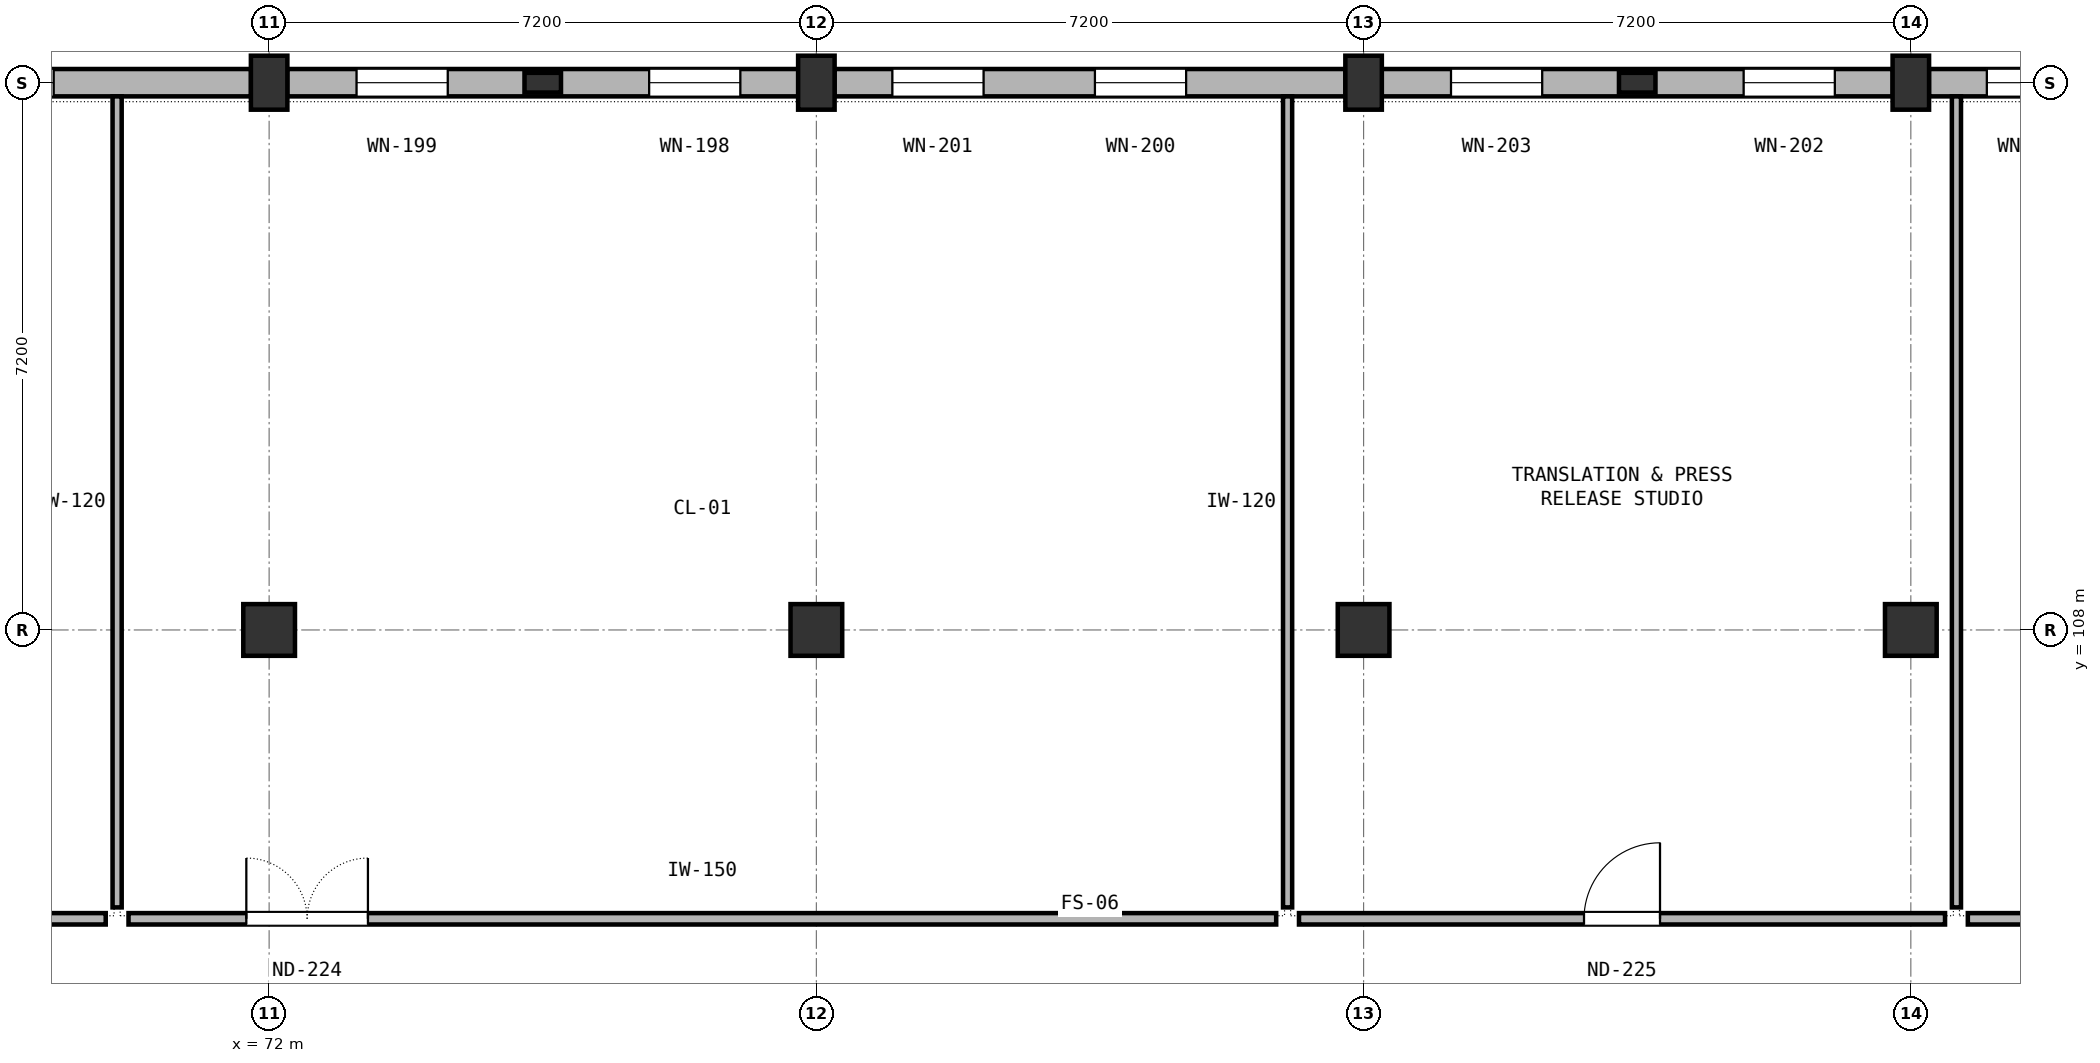
"""IFC4 building model, lengths in metres.
Left out: names, types, materials, properties, quantities, classifications, styles, units other than length and angle.
Written with IfcOpenShell. Run it as: python <this file> out.ifc"""

import sys

from ifc_helpers import new_model, si_unit, direction, frame, frame_2d, origin, origin_2d, place, context, subcontext, project, spatial, rectangle, extrude, element, fill, save


model = new_model("IFC4")
c1 = context("Model", 3, precision=1e-05, world=origin(), true_north=direction((0.0, 1.0)))
c2 = subcontext(c1, "Body", "Model", "MODEL_VIEW")
j1 = project(units=[si_unit("LENGTHUNIT", "METRE"), si_unit("PLANEANGLEUNIT", "RADIAN")], contexts=[c1])
p1 = place(None, origin())
s1 = spatial("IfcSite", under=j1, at=p1, CompositionType="ELEMENT")
p2 = place(p1, origin())
s2 = spatial("IfcBuilding", under=s1, at=p2, CompositionType="ELEMENT")
p3 = place(p2, frame((0.0, 0.0, 26.4)))
s3 = spatial("IfcBuildingStorey", under=s2, at=p3, CompositionType="ELEMENT", Elevation=26.4)
p4 = place(p3, frame((72.0, 108.0, 0.0), z_axis=(0.0, 0.0, 1.0), x_axis=(1.0, 0.0, 0.0)))
e1 = element("IfcColumn", 1, at=p4, inside=s3, PredefinedType="COLUMN", context=c2, shape_type="SweptSolid", body=[
    extrude(rectangle(XDim=0.68, YDim=0.68, at=origin_2d()), origin(), (0.0, 0.0, 1.0), 3.9),
])
p5 = place(p3, frame((72.0, 115.2, 0.0), z_axis=(0.0, 0.0, 1.0), x_axis=(1.0, 0.0, 0.0)))
e2 = element("IfcColumn", 2, at=p5, inside=s3, PredefinedType="COLUMN", context=c2, shape_type="SweptSolid", body=[
    extrude(rectangle(XDim=0.48, YDim=0.71, at=origin_2d()), origin(), (0.0, 0.0, 1.0), 3.9),
])
p6 = place(p3, frame((79.2, 108.0, 0.0), z_axis=(0.0, 0.0, 1.0), x_axis=(1.0, 0.0, 0.0)))
e3 = element("IfcColumn", 3, at=p6, inside=s3, PredefinedType="COLUMN", context=c2, shape_type="SweptSolid", body=[
    extrude(rectangle(XDim=0.68, YDim=0.68, at=origin_2d()), origin(), (0.0, 0.0, 1.0), 3.9),
])
p7 = place(p3, frame((79.2, 115.2, 0.0), z_axis=(0.0, 0.0, 1.0), x_axis=(1.0, 0.0, 0.0)))
e4 = element("IfcColumn", 4, at=p7, inside=s3, PredefinedType="COLUMN", context=c2, shape_type="SweptSolid", body=[
    extrude(rectangle(XDim=0.48, YDim=0.71, at=origin_2d()), origin(), (0.0, 0.0, 1.0), 3.9),
])
p8 = place(p3, frame((86.4, 108.0, 0.0), z_axis=(0.0, 0.0, 1.0), x_axis=(1.0, 0.0, 0.0)))
e5 = element("IfcColumn", 5, at=p8, inside=s3, PredefinedType="COLUMN", context=c2, shape_type="SweptSolid", body=[
    extrude(rectangle(XDim=0.68, YDim=0.68, at=origin_2d()), origin(), (0.0, 0.0, 1.0), 3.9),
])
p9 = place(p3, frame((86.4, 115.2, 0.0), z_axis=(0.0, 0.0, 1.0), x_axis=(1.0, 0.0, 0.0)))
e6 = element("IfcColumn", 6, at=p9, inside=s3, PredefinedType="COLUMN", context=c2, shape_type="SweptSolid", body=[
    extrude(rectangle(XDim=0.48, YDim=0.71, at=origin_2d()), origin(), (0.0, 0.0, 1.0), 3.9),
])
p10 = place(p3, frame((93.6, 108.0, 0.0), z_axis=(0.0, 0.0, 1.0), x_axis=(1.0, 0.0, 0.0)))
e7 = element("IfcColumn", 7, at=p10, inside=s3, PredefinedType="COLUMN", context=c2, shape_type="SweptSolid", body=[
    extrude(rectangle(XDim=0.68, YDim=0.68, at=origin_2d()), origin(), (0.0, 0.0, 1.0), 3.9),
])
p11 = place(p3, frame((93.6, 115.2, 0.0), z_axis=(0.0, 0.0, 1.0), x_axis=(1.0, 0.0, 0.0)))
e8 = element("IfcColumn", 8, at=p11, inside=s3, PredefinedType="COLUMN", context=c2, shape_type="SweptSolid", body=[
    extrude(rectangle(XDim=0.48, YDim=0.71, at=origin_2d()), origin(), (0.0, 0.0, 1.0), 3.9),
])
for number, where, z_axis, x_axis in (
    (9, (75.6, 115.2, 0.0), (0.0, 0.0, 1.0), (1.0, 0.0, 0.0)),
    (10, (90.0, 115.2, 0.0), (0.0, 0.0, 1.0), (1.0, 0.0, 0.0)),
):
    element("IfcColumn", number, at=place(p3, frame(where, z_axis=z_axis, x_axis=x_axis)), inside=s3, PredefinedType="PILASTER", context=c2, shape_type="SweptSolid", body=[
        extrude(rectangle(XDim=0.48, YDim=0.26, at=origin_2d()), origin(), (0.0, 0.0, 1.0), 3.9),
    ])
p12 = place(p3, frame((71.762, 115.2, 0.0), z_axis=(0.0, 0.0, 1.0), x_axis=(-1.0, 0.0, 0.0)))
e11 = element("IfcWall", 11, at=p12, inside=s3, PredefinedType="SOLIDWALL", context=c2, shape_type="SweptSolid", body=[
    extrude(rectangle(XDim=6.724, YDim=0.36, at=frame_2d((3.362, 0.0))), origin(), (0.0, 0.0, 1.0), 2.74),
])
p13 = place(p12, frame((2.597, 0.0, 0.7)))
e12 = element("IfcOpeningElement", 12, at=p13, cuts=e11, PredefinedType="OPENING", context=c2, shape_type="SweptSolid", body=[
    extrude(rectangle(XDim=1.2, YDim=1.84, at=frame_2d((0.6, 0.92))), frame((0.0, 0.19, 0.0), z_axis=(0.0, -1.0, 0.0), x_axis=(1.0, 0.0, 0.0)), (0.0, 0.0, 1.0), 0.38),
])
p14 = place(p12, frame((4.762, 0.0, 0.7)))
e13 = element("IfcOpeningElement", 13, at=p14, cuts=e11, PredefinedType="OPENING", context=c2, shape_type="SweptSolid", body=[
    extrude(rectangle(XDim=1.2, YDim=1.84, at=frame_2d((0.6, 0.92))), frame((0.0, 0.19, 0.0), z_axis=(0.0, -1.0, 0.0), x_axis=(1.0, 0.0, 0.0)), (0.0, 0.0, 1.0), 0.38),
])
p15 = place(p3, frame((78.962, 115.2, 0.0), z_axis=(0.0, 0.0, 1.0), x_axis=(-1.0, 0.0, 0.0)))
e14 = element("IfcWall", 14, at=p15, inside=s3, PredefinedType="SOLIDWALL", context=c2, shape_type="SweptSolid", body=[
    extrude(rectangle(XDim=6.724, YDim=0.36, at=frame_2d((3.362, 0.0))), origin(), (0.0, 0.0, 1.0), 2.74),
])
p16 = place(p15, frame((0.762, 0.0, 0.7)))
e15 = element("IfcOpeningElement", 15, at=p16, cuts=e14, PredefinedType="OPENING", context=c2, shape_type="SweptSolid", body=[
    extrude(rectangle(XDim=1.2, YDim=1.84, at=frame_2d((0.6, 0.92))), frame((0.0, 0.19, 0.0), z_axis=(0.0, -1.0, 0.0), x_axis=(1.0, 0.0, 0.0)), (0.0, 0.0, 1.0), 0.38),
])
p17 = place(p15, frame((4.612, 0.0, 0.7)))
e16 = element("IfcOpeningElement", 16, at=p17, cuts=e14, PredefinedType="OPENING", context=c2, shape_type="SweptSolid", body=[
    extrude(rectangle(XDim=1.2, YDim=1.84, at=frame_2d((0.6, 0.92))), frame((0.0, 0.19, 0.0), z_axis=(0.0, -1.0, 0.0), x_axis=(1.0, 0.0, 0.0)), (0.0, 0.0, 1.0), 0.38),
])
p18 = place(p3, frame((86.162, 115.2, 0.0), z_axis=(0.0, 0.0, 1.0), x_axis=(-1.0, 0.0, 0.0)))
e17 = element("IfcWall", 17, at=p18, inside=s3, PredefinedType="SOLIDWALL", context=c2, shape_type="SweptSolid", body=[
    extrude(rectangle(XDim=6.724, YDim=0.36, at=frame_2d((3.362, 0.0))), origin(), (0.0, 0.0, 1.0), 2.74),
])
p19 = place(p18, frame((2.097, 0.0, 0.7)))
e18 = element("IfcOpeningElement", 18, at=p19, cuts=e17, PredefinedType="OPENING", context=c2, shape_type="SweptSolid", body=[
    extrude(rectangle(XDim=1.2, YDim=1.84, at=frame_2d((0.6, 0.92))), frame((0.0, 0.19, 0.0), z_axis=(0.0, -1.0, 0.0), x_axis=(1.0, 0.0, 0.0)), (0.0, 0.0, 1.0), 0.38),
])
p20 = place(p18, frame((4.762, 0.0, 0.7)))
e19 = element("IfcOpeningElement", 19, at=p20, cuts=e17, PredefinedType="OPENING", context=c2, shape_type="SweptSolid", body=[
    extrude(rectangle(XDim=1.2, YDim=1.84, at=frame_2d((0.6, 0.92))), frame((0.0, 0.19, 0.0), z_axis=(0.0, -1.0, 0.0), x_axis=(1.0, 0.0, 0.0)), (0.0, 0.0, 1.0), 0.38),
])
p21 = place(p3, frame((93.362, 115.2, 0.0), z_axis=(0.0, 0.0, 1.0), x_axis=(-1.0, 0.0, 0.0)))
e20 = element("IfcWall", 20, at=p21, inside=s3, PredefinedType="SOLIDWALL", context=c2, shape_type="SweptSolid", body=[
    extrude(rectangle(XDim=6.724, YDim=0.36, at=frame_2d((3.362, 0.0))), origin(), (0.0, 0.0, 1.0), 2.74),
])
p22 = place(p21, frame((0.762, 0.0, 0.7)))
e21 = element("IfcOpeningElement", 21, at=p22, cuts=e20, PredefinedType="OPENING", context=c2, shape_type="SweptSolid", body=[
    extrude(rectangle(XDim=1.2, YDim=1.84, at=frame_2d((0.6, 0.92))), frame((0.0, 0.19, 0.0), z_axis=(0.0, -1.0, 0.0), x_axis=(1.0, 0.0, 0.0)), (0.0, 0.0, 1.0), 0.38),
])
p23 = place(p21, frame((4.612, 0.0, 0.7)))
e22 = element("IfcOpeningElement", 22, at=p23, cuts=e20, PredefinedType="OPENING", context=c2, shape_type="SweptSolid", body=[
    extrude(rectangle(XDim=1.2, YDim=1.84, at=frame_2d((0.6, 0.92))), frame((0.0, 0.19, 0.0), z_axis=(0.0, -1.0, 0.0), x_axis=(1.0, 0.0, 0.0)), (0.0, 0.0, 1.0), 0.38),
])
p24 = place(p3, frame((100.562, 115.2, 0.0), z_axis=(0.0, 0.0, 1.0), x_axis=(-1.0, 0.0, 0.0)))
e23 = element("IfcWall", 23, at=p24, inside=s3, PredefinedType="SOLIDWALL", context=c2, shape_type="SweptSolid", body=[
    extrude(rectangle(XDim=6.724, YDim=0.36, at=frame_2d((3.362, 0.0))), origin(), (0.0, 0.0, 1.0), 2.74),
])
p25 = place(p24, frame((0.912, 0.0, 0.7)))
e24 = element("IfcOpeningElement", 24, at=p25, cuts=e23, PredefinedType="OPENING", context=c2, shape_type="SweptSolid", body=[
    extrude(rectangle(XDim=1.2, YDim=1.84, at=frame_2d((0.6, 0.92))), frame((0.0, 0.19, 0.0), z_axis=(0.0, -1.0, 0.0), x_axis=(1.0, 0.0, 0.0)), (0.0, 0.0, 1.0), 0.38),
])
p26 = place(p24, frame((4.762, 0.0, 0.7)))
e25 = element("IfcOpeningElement", 25, at=p26, cuts=e23, PredefinedType="OPENING", context=c2, shape_type="SweptSolid", body=[
    extrude(rectangle(XDim=1.2, YDim=1.84, at=frame_2d((0.6, 0.92))), frame((0.0, 0.19, 0.0), z_axis=(0.0, -1.0, 0.0), x_axis=(1.0, 0.0, 0.0)), (0.0, 0.0, 1.0), 0.38),
])
p27 = place(p3, frame((53.75, 104.2, 0.0), z_axis=(0.0, 0.0, 1.0), x_axis=(1.0, 0.0, 0.0)))
e26 = element("IfcWall", 26, at=p27, inside=s3, PredefinedType="PARTITIONING", context=c2, shape_type="SweptSolid", body=[
    extrude(rectangle(XDim=16.1, YDim=0.15, at=frame_2d((8.05, 0.0))), origin(), (0.0, 0.0, 1.0), 2.78),
])
p28 = place(p27, frame((7.35, 0.0, 0.0)))
e27 = element("IfcOpeningElement", 27, at=p28, cuts=e26, PredefinedType="OPENING", context=c2, shape_type="SweptSolid", body=[
    extrude(rectangle(XDim=1.4, YDim=2.2, at=frame_2d((0.7, 1.1))), frame((0.0, 0.085, 0.0), z_axis=(0.0, -1.0, 0.0), x_axis=(1.0, 0.0, 0.0)), (0.0, 0.0, 1.0), 0.17),
])
p29 = place(p3, frame((70.15, 104.2, 0.0), z_axis=(0.0, 0.0, 1.0), x_axis=(1.0, 0.0, 0.0)))
e28 = element("IfcWall", 28, at=p29, inside=s3, PredefinedType="PARTITIONING", context=c2, shape_type="SweptSolid", body=[
    extrude(rectangle(XDim=15.1, YDim=0.15, at=frame_2d((7.55, 0.0))), origin(), (0.0, 0.0, 1.0), 2.78),
])
p30 = place(p29, frame((1.55, 0.0, 0.0)))
e29 = element("IfcOpeningElement", 29, at=p30, cuts=e28, PredefinedType="OPENING", context=c2, shape_type="SweptSolid", body=[
    extrude(rectangle(XDim=1.6, YDim=2.2, at=frame_2d((0.8, 1.1))), frame((0.0, 0.085, 0.0), z_axis=(0.0, -1.0, 0.0), x_axis=(1.0, 0.0, 0.0)), (0.0, 0.0, 1.0), 0.17),
])
p31 = place(p3, frame((70.0, 104.35, 0.0), z_axis=(0.0, 0.0, 1.0), x_axis=(0.0, 1.0, 0.0)))
e30 = element("IfcWall", 30, at=p31, inside=s3, PredefinedType="PARTITIONING", context=c2, shape_type="SweptSolid", body=[
    extrude(rectangle(XDim=10.67, YDim=0.12, at=frame_2d((5.335, 0.0))), origin(), (0.0, 0.0, 1.0), 2.78),
])
p32 = place(p3, frame((85.55, 104.2, 0.0), z_axis=(0.0, 0.0, 1.0), x_axis=(1.0, 0.0, 0.0)))
e31 = element("IfcWall", 31, at=p32, inside=s3, PredefinedType="PARTITIONING", context=c2, shape_type="SweptSolid", body=[
    extrude(rectangle(XDim=8.5, YDim=0.15, at=frame_2d((4.25, 0.0))), origin(), (0.0, 0.0, 1.0), 2.78),
])
p33 = place(p32, frame((3.75, 0.0, 0.0)))
e32 = element("IfcOpeningElement", 32, at=p33, cuts=e31, PredefinedType="OPENING", context=c2, shape_type="SweptSolid", body=[
    extrude(rectangle(XDim=1.0, YDim=2.15, at=frame_2d((0.5, 1.075))), frame((0.0, 0.085, 0.0), z_axis=(0.0, -1.0, 0.0), x_axis=(1.0, 0.0, 0.0)), (0.0, 0.0, 1.0), 0.17),
])
p34 = place(p3, frame((85.4, 104.35, 0.0), z_axis=(0.0, 0.0, 1.0), x_axis=(0.0, 1.0, 0.0)))
e33 = element("IfcWall", 33, at=p34, inside=s3, PredefinedType="PARTITIONING", context=c2, shape_type="SweptSolid", body=[
    extrude(rectangle(XDim=10.67, YDim=0.12, at=frame_2d((5.335, 0.0))), origin(), (0.0, 0.0, 1.0), 2.78),
])
p35 = place(p3, frame((94.35, 104.2, 0.0), z_axis=(0.0, 0.0, 1.0), x_axis=(1.0, 0.0, 0.0)))
e34 = element("IfcWall", 34, at=p35, inside=s3, PredefinedType="PARTITIONING", context=c2, shape_type="SweptSolid", body=[
    extrude(rectangle(XDim=5.7, YDim=0.15, at=frame_2d((2.85, 0.0))), origin(), (0.0, 0.0, 1.0), 2.78),
])
p36 = place(p35, frame((2.325, 0.0, 0.0)))
e35 = element("IfcOpeningElement", 35, at=p36, cuts=e34, PredefinedType="OPENING", context=c2, shape_type="SweptSolid", body=[
    extrude(rectangle(XDim=1.05, YDim=2.15, at=frame_2d((0.525, 1.075))), frame((0.0, 0.085, 0.0), z_axis=(0.0, -1.0, 0.0), x_axis=(1.0, 0.0, 0.0)), (0.0, 0.0, 1.0), 0.17),
])
p37 = place(p3, frame((94.2, 104.35, 0.0), z_axis=(0.0, 0.0, 1.0), x_axis=(0.0, 1.0, 0.0)))
e36 = element("IfcWall", 36, at=p37, inside=s3, PredefinedType="PARTITIONING", context=c2, shape_type="SweptSolid", body=[
    extrude(rectangle(XDim=10.67, YDim=0.12, at=frame_2d((5.335, 0.0))), origin(), (0.0, 0.0, 1.0), 2.78),
])
p38 = place(p13, origin())
e37 = element("IfcWindow", 37, at=p38, inside=s3, PartitioningType="DOUBLE_PANEL_VERTICAL", PredefinedType="WINDOW", context=c2, shape_type="SweptSolid", body=[
    extrude(rectangle(XDim=1.2, YDim=1.84, at=frame_2d((0.6, 0.92))), frame((0.0, 0.03, 0.0), z_axis=(0.0, -1.0, 0.0), x_axis=(1.0, 0.0, 0.0)), (0.0, 0.0, 1.0), 0.06),
])
fill(e12, e37)
p39 = place(p16, origin())
e38 = element("IfcWindow", 38, at=p39, inside=s3, PartitioningType="DOUBLE_PANEL_VERTICAL", PredefinedType="WINDOW", context=c2, shape_type="SweptSolid", body=[
    extrude(rectangle(XDim=1.2, YDim=1.84, at=frame_2d((0.6, 0.92))), frame((0.0, 0.03, 0.0), z_axis=(0.0, -1.0, 0.0), x_axis=(1.0, 0.0, 0.0)), (0.0, 0.0, 1.0), 0.06),
])
fill(e15, e38)
p40 = place(p17, origin())
e39 = element("IfcWindow", 39, at=p40, inside=s3, PartitioningType="DOUBLE_PANEL_VERTICAL", PredefinedType="WINDOW", context=c2, shape_type="SweptSolid", body=[
    extrude(rectangle(XDim=1.2, YDim=1.84, at=frame_2d((0.6, 0.92))), frame((0.0, 0.03, 0.0), z_axis=(0.0, -1.0, 0.0), x_axis=(1.0, 0.0, 0.0)), (0.0, 0.0, 1.0), 0.06),
])
fill(e16, e39)
p41 = place(p19, origin())
e40 = element("IfcWindow", 40, at=p41, inside=s3, PartitioningType="DOUBLE_PANEL_VERTICAL", PredefinedType="WINDOW", context=c2, shape_type="SweptSolid", body=[
    extrude(rectangle(XDim=1.2, YDim=1.84, at=frame_2d((0.6, 0.92))), frame((0.0, 0.03, 0.0), z_axis=(0.0, -1.0, 0.0), x_axis=(1.0, 0.0, 0.0)), (0.0, 0.0, 1.0), 0.06),
])
fill(e18, e40)
p42 = place(p20, origin())
e41 = element("IfcWindow", 41, at=p42, inside=s3, PartitioningType="DOUBLE_PANEL_VERTICAL", PredefinedType="WINDOW", context=c2, shape_type="SweptSolid", body=[
    extrude(rectangle(XDim=1.2, YDim=1.84, at=frame_2d((0.6, 0.92))), frame((0.0, 0.03, 0.0), z_axis=(0.0, -1.0, 0.0), x_axis=(1.0, 0.0, 0.0)), (0.0, 0.0, 1.0), 0.06),
])
fill(e19, e41)
p43 = place(p22, origin())
e42 = element("IfcWindow", 42, at=p43, inside=s3, PartitioningType="DOUBLE_PANEL_VERTICAL", PredefinedType="WINDOW", context=c2, shape_type="SweptSolid", body=[
    extrude(rectangle(XDim=1.2, YDim=1.84, at=frame_2d((0.6, 0.92))), frame((0.0, 0.03, 0.0), z_axis=(0.0, -1.0, 0.0), x_axis=(1.0, 0.0, 0.0)), (0.0, 0.0, 1.0), 0.06),
])
fill(e21, e42)
p44 = place(p23, origin())
e43 = element("IfcWindow", 43, at=p44, inside=s3, PartitioningType="DOUBLE_PANEL_VERTICAL", PredefinedType="WINDOW", context=c2, shape_type="SweptSolid", body=[
    extrude(rectangle(XDim=1.2, YDim=1.84, at=frame_2d((0.6, 0.92))), frame((0.0, 0.03, 0.0), z_axis=(0.0, -1.0, 0.0), x_axis=(1.0, 0.0, 0.0)), (0.0, 0.0, 1.0), 0.06),
])
fill(e22, e43)
p45 = place(p26, origin())
e44 = element("IfcWindow", 44, at=p45, inside=s3, PartitioningType="DOUBLE_PANEL_VERTICAL", PredefinedType="WINDOW", context=c2, shape_type="SweptSolid", body=[
    extrude(rectangle(XDim=1.2, YDim=1.84, at=frame_2d((0.6, 0.92))), frame((0.0, 0.03, 0.0), z_axis=(0.0, -1.0, 0.0), x_axis=(1.0, 0.0, 0.0)), (0.0, 0.0, 1.0), 0.06),
])
fill(e25, e44)
p46 = place(p30, origin())
e45 = element("IfcDoor", 45, at=p46, inside=s3, OperationType="DOUBLE_DOOR_SINGLE_SWING", PredefinedType="DOOR", context=c2, shape_type="SweptSolid", body=[
    extrude(rectangle(XDim=1.6, YDim=2.2, at=frame_2d((0.8, 1.1))), frame((0.0, 0.025, 0.0), z_axis=(0.0, -1.0, 0.0), x_axis=(1.0, 0.0, 0.0)), (0.0, 0.0, 1.0), 0.05),
])
fill(e29, e45)
p47 = place(p33, origin())
e46 = element("IfcDoor", 46, at=p47, inside=s3, OperationType="SINGLE_SWING_RIGHT", PredefinedType="DOOR", context=c2, shape_type="SweptSolid", body=[
    extrude(rectangle(XDim=1.0, YDim=2.15, at=frame_2d((0.5, 1.075))), frame((0.0, 0.025, 0.0), z_axis=(0.0, -1.0, 0.0), x_axis=(1.0, 0.0, 0.0)), (0.0, 0.0, 1.0), 0.05),
])
fill(e32, e46)
save(model, sys.argv[1])
